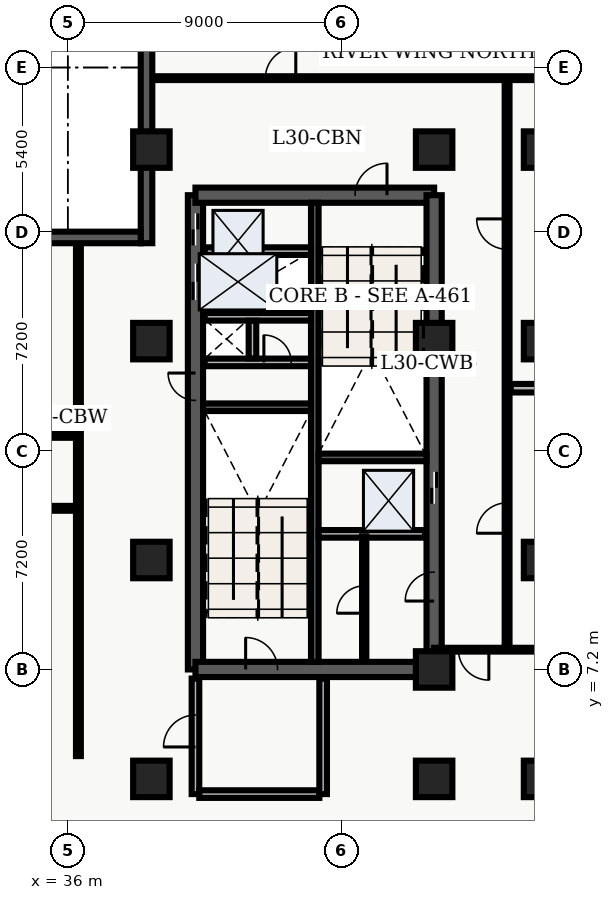
"""IFC4 building model, lengths in metres.
Left out: names, types, materials, properties, quantities, classifications, styles, units other than length and angle.
Written with IfcOpenShell. Run it as: python <this file> out.ifc"""

import sys

from ifc_helpers import new_model, entity, si_unit, converted_unit, direction, frame, origin_with_axes, origin_2d_with_axis, place, context, subcontext, project, spatial, polyline, rectangle, outline, extrude, element, fill, save


model = new_model("IFC4")
c1 = context("Model", 3, precision=1e-05, world=origin_with_axes(), true_north=direction((0.0, 1.0)))
c2 = subcontext(c1, "Body", "Model", "MODEL_VIEW")
j1 = project(units=[si_unit("LENGTHUNIT", "METRE"), converted_unit("PLANEANGLEUNIT", "DEGREE", entity("IfcPlaneAngleMeasure", 0.017), si_unit("PLANEANGLEUNIT", "RADIAN"), dimensions=[0, 0, 0, 0, 0, 0, 0])], contexts=[c1])
p1 = place(None, origin_with_axes())
s1 = spatial("IfcSite", under=j1, at=p1, CompositionType="ELEMENT")
p2 = place(p1, origin_with_axes())
s2 = spatial("IfcBuilding", under=s1, at=p2, CompositionType="ELEMENT")
p3 = place(p2, frame((0.0, 0.0, 124.2), z_axis=(0.0, 0.0, 1.0), x_axis=(1.0, 0.0, 0.0)))
s3 = spatial("IfcBuildingStorey", under=s2, at=p3, CompositionType="ELEMENT", Elevation=124.2)
p4 = place(p3, frame((40.2, 7.2, 0.0), z_axis=(0.0, 0.0, 1.0), x_axis=(0.0, 1.0, 0.0)))
e1 = element("IfcWall", 1, at=p4, inside=s3, PredefinedType="SHEAR", context=c2, shape_type="SweptSolid", body=[
    extrude(outline(polyline([(0.0, -0.25), (15.6, -0.25), (15.6, 0.25), (0.0, 0.25), (0.0, -0.25)])), origin_with_axes(), (0.0, 0.0, 1.0), 4.56),
])
p5 = place(p4, frame((14.475, 0.0, 0.0), z_axis=(0.0, 0.0, 1.0), x_axis=(1.0, 0.0, 0.0)))
e2 = element("IfcOpeningElement", 2, at=p5, cuts=e1, PredefinedType="OPENING", context=c2, shape_type="SweptSolid", body=[
    extrude(rectangle(XDim=1.05, YDim=0.52, at=origin_2d_with_axis()), origin_with_axes(), (0.0, 0.0, 1.0), 2.15),
])
p6 = place(p4, frame((12.75, 0.0, 0.0), z_axis=(0.0, 0.0, 1.0), x_axis=(1.0, 0.0, 0.0)))
e3 = element("IfcOpeningElement", 3, at=p6, cuts=e1, PredefinedType="OPENING", context=c2, shape_type="SweptSolid", body=[
    extrude(rectangle(XDim=1.2, YDim=0.52, at=origin_2d_with_axis()), origin_with_axes(), (0.0, 0.0, 1.0), 2.15),
])
p7 = place(p4, frame((9.3, 0.0, 0.0), z_axis=(0.0, 0.0, 1.0), x_axis=(1.0, 0.0, 0.0)))
e4 = element("IfcOpeningElement", 4, at=p7, cuts=e1, PredefinedType="OPENING", context=c2, shape_type="SweptSolid", body=[
    extrude(rectangle(XDim=0.9, YDim=0.52, at=origin_2d_with_axis()), origin_with_axes(), (0.0, 0.0, 1.0), 2.15),
])
p8 = place(p3, frame((40.2, 7.2, 0.0), z_axis=(0.0, 0.0, 1.0), x_axis=(1.0, 0.0, 0.0)))
e5 = element("IfcWall", 5, at=p8, inside=s3, PredefinedType="SHEAR", context=c2, shape_type="SweptSolid", body=[
    extrude(outline(polyline([(0.0, -0.25), (7.85, -0.25), (7.85, 0.25), (0.0, 0.25), (0.0, -0.25)])), origin_with_axes(), (0.0, 0.0, 1.0), 4.56),
])
p9 = place(p8, frame((2.175, 0.0, 0.0), z_axis=(0.0, 0.0, 1.0), x_axis=(1.0, 0.0, 0.0)))
e6 = element("IfcOpeningElement", 6, at=p9, cuts=e5, PredefinedType="OPENING", context=c2, shape_type="SweptSolid", body=[
    extrude(rectangle(XDim=1.05, YDim=0.52, at=origin_2d_with_axis()), origin_with_axes(), (0.0, 0.0, 1.0), 2.15),
])
p10 = place(p3, frame((40.2, 22.8, 0.0), z_axis=(0.0, 0.0, 1.0), x_axis=(1.0, 0.0, 0.0)))
e7 = element("IfcWall", 7, at=p10, inside=s3, PredefinedType="SHEAR", context=c2, shape_type="SweptSolid", body=[
    extrude(outline(polyline([(0.0, -0.25), (7.85, -0.25), (7.85, 0.25), (0.0, 0.25), (0.0, -0.25)])), origin_with_axes(), (0.0, 0.0, 1.0), 4.56),
])
p11 = place(p10, frame((5.775, 0.0, 0.0), z_axis=(0.0, 0.0, 1.0), x_axis=(1.0, 0.0, 0.0)))
e8 = element("IfcOpeningElement", 8, at=p11, cuts=e7, PredefinedType="OPENING", context=c2, shape_type="SweptSolid", body=[
    extrude(rectangle(XDim=1.05, YDim=0.52, at=origin_2d_with_axis()), origin_with_axes(), (0.0, 0.0, 1.0), 2.15),
])
p12 = place(p3, frame((48.05, 7.2, 0.0), z_axis=(0.0, 0.0, 1.0), x_axis=(0.0, 1.0, 0.0)))
e9 = element("IfcWall", 9, at=p12, inside=s3, PredefinedType="SHEAR", context=c2, shape_type="SweptSolid", body=[
    extrude(outline(polyline([(0.0, -0.25), (15.6, -0.25), (15.6, 0.25), (0.0, 0.25), (0.0, -0.25)])), origin_with_axes(), (0.0, 0.0, 1.0), 4.56),
])
p13 = place(p12, frame((5.975, 0.0, 0.0), z_axis=(0.0, 0.0, 1.0), x_axis=(1.0, 0.0, 0.0)))
e10 = element("IfcOpeningElement", 10, at=p13, cuts=e9, PredefinedType="OPENING", context=c2, shape_type="SweptSolid", body=[
    extrude(rectangle(XDim=1.05, YDim=0.52, at=origin_2d_with_axis()), origin_with_axes(), (0.0, 0.0, 1.0), 2.15),
])
p14 = place(p12, frame((2.725, 0.0, 0.0), z_axis=(0.0, 0.0, 1.0), x_axis=(1.0, 0.0, 0.0)))
e11 = element("IfcOpeningElement", 11, at=p14, cuts=e9, PredefinedType="OPENING", context=c2, shape_type="SweptSolid", body=[
    extrude(rectangle(XDim=0.95, YDim=0.52, at=origin_2d_with_axis()), origin_with_axes(), (0.0, 0.0, 1.0), 2.15),
])
p15 = place(p3, frame((44.125, 7.45, 0.0), z_axis=(0.0, 0.0, 1.0), x_axis=(0.0, 1.0, 0.0)))
e12 = element("IfcWall", 12, at=p15, inside=s3, PredefinedType="SHEAR", context=c2, shape_type="SweptSolid", body=[
    extrude(outline(polyline([(0.0, -0.125), (15.1, -0.125), (15.1, 0.125), (0.0, 0.125), (0.0, -0.125)])), origin_with_axes(), (0.0, 0.0, 1.0), 4.56),
])
for number, where, z_axis, x_axis in (
    (13, (40.45, 15.825, 0.0), (0.0, 0.0, 1.0), (1.0, 0.0, 0.0)),
    (14, (44.25, 14.175, 0.0), (0.0, 0.0, 1.0), (1.0, 0.0, 0.0)),
):
    element("IfcWall", number, at=place(p3, frame(where, z_axis=z_axis, x_axis=x_axis)), inside=s3, PredefinedType="SHEAR", context=c2, shape_type="SweptSolid", body=[
        extrude(outline(polyline([(0.0, -0.125), (3.55, -0.125), (3.55, 0.125), (0.0, 0.125), (0.0, -0.125)])), origin_with_axes(), (0.0, 0.0, 1.0), 4.56),
    ])
p16 = place(p3, frame((40.5, 17.3, 0.0), z_axis=(0.0, 0.0, 1.0), x_axis=(1.0, 0.0, 0.0)))
e15 = element("IfcWall", 15, at=p16, inside=s3, PredefinedType="SOLIDWALL", context=c2, shape_type="SweptSolid", body=[
    extrude(outline(polyline([(0.0, -0.125), (3.5, -0.125), (3.5, 0.125), (0.0, 0.125), (0.0, -0.125)])), origin_with_axes(), (0.0, 0.0, 1.0), 3.6),
])
p17 = place(p16, frame((2.4, 0.0, 0.0), z_axis=(0.0, 0.0, 1.0), x_axis=(1.0, 0.0, 0.0)))
e16 = element("IfcOpeningElement", 16, at=p17, cuts=e15, PredefinedType="OPENING", context=c2, shape_type="SweptSolid", body=[
    extrude(rectangle(XDim=0.9, YDim=0.27, at=origin_2d_with_axis()), origin_with_axes(), (0.0, 0.0, 1.0), 2.15),
])
p18 = place(p3, frame((40.5, 18.8, 0.0), z_axis=(0.0, 0.0, 1.0), x_axis=(1.0, 0.0, 0.0)))
e17 = element("IfcWall", 17, at=p18, inside=s3, PredefinedType="SOLIDWALL", context=c2, shape_type="SweptSolid", body=[
    extrude(outline(polyline([(0.0, -0.125), (3.5, -0.125), (3.5, 0.125), (0.0, 0.125), (0.0, -0.125)])), origin_with_axes(), (0.0, 0.0, 1.0), 3.6),
])
p19 = place(p3, frame((42.075, 17.43, 0.0), z_axis=(0.0, 0.0, 1.0), x_axis=(0.0, 1.0, 0.0)))
e18 = element("IfcWall", 18, at=p19, inside=s3, PredefinedType="SOLIDWALL", context=c2, shape_type="SweptSolid", body=[
    extrude(outline(polyline([(0.0, -0.125), (1.24, -0.125), (1.24, 0.125), (0.0, 0.125), (0.0, -0.125)])), origin_with_axes(), (0.0, 0.0, 1.0), 3.6),
])
p20 = place(p3, frame((40.2, 3.1, 0.0), z_axis=(0.0, 0.0, 1.0), x_axis=(0.0, 1.0, 0.0)))
e19 = element("IfcWall", 19, at=p20, inside=s3, PredefinedType="SOLIDWALL", context=c2, shape_type="SweptSolid", body=[
    extrude(outline(polyline([(0.0, -0.125), (3.8, -0.125), (3.8, 0.125), (0.0, 0.125), (0.0, -0.125)])), origin_with_axes(), (0.0, 0.0, 1.0), 3.6),
])
p21 = place(p20, frame((2.075, 0.0, 0.0), z_axis=(0.0, 0.0, 1.0), x_axis=(1.0, 0.0, 0.0)))
e20 = element("IfcOpeningElement", 20, at=p21, cuts=e19, PredefinedType="OPENING", context=c2, shape_type="SweptSolid", body=[
    extrude(rectangle(XDim=1.05, YDim=0.27, at=origin_2d_with_axis()), origin_with_axes(), (0.0, 0.0, 1.0), 2.15),
])
p22 = place(p3, frame((40.325, 3.1, 0.0), z_axis=(0.0, 0.0, 1.0), x_axis=(1.0, 0.0, 0.0)))
e21 = element("IfcWall", 21, at=p22, inside=s3, PredefinedType="SOLIDWALL", context=c2, shape_type="SweptSolid", body=[
    extrude(outline(polyline([(0.0, -0.125), (3.95, -0.125), (3.95, 0.125), (0.0, 0.125), (0.0, -0.125)])), origin_with_axes(), (0.0, 0.0, 1.0), 3.6),
])
p23 = place(p3, frame((44.4, 3.1, 0.0), z_axis=(0.0, 0.0, 1.0), x_axis=(0.0, 1.0, 0.0)))
e22 = element("IfcWall", 22, at=p23, inside=s3, PredefinedType="SOLIDWALL", context=c2, shape_type="SweptSolid", body=[
    extrude(outline(polyline([(0.0, -0.125), (3.8, -0.125), (3.8, 0.125), (0.0, 0.125), (0.0, -0.125)])), origin_with_axes(), (0.0, 0.0, 1.0), 3.6),
])
for number, where, z_axis, x_axis in (
    (23, (38.75, 3.6, 0.0), (0.0, 0.0, 1.0), (1.0, 0.0, 0.0)),
    (24, (38.75, 10.8, 0.0), (0.0, 0.0, 1.0), (1.0, 0.0, 0.0)),
    (25, (38.75, 18.0, 0.0), (0.0, 0.0, 1.0), (1.0, 0.0, 0.0)),
    (26, (38.75, 24.3, 0.0), (0.0, 0.0, 1.0), (1.0, 0.0, 0.0)),
    (27, (48.05, 3.6, 0.0), (0.0, 0.0, 1.0), (1.0, 0.0, 0.0)),
    (28, (48.05, 7.2, 0.0), (0.0, 0.0, 1.0), (1.0, 0.0, 0.0)),
    (29, (48.05, 18.0, 0.0), (0.0, 0.0, 1.0), (1.0, 0.0, 0.0)),
    (30, (48.05, 24.3, 0.0), (0.0, 0.0, 1.0), (1.0, 0.0, 0.0)),
    (31, (51.6, 3.6, 0.0), (0.0, 0.0, 1.0), (1.0, 0.0, 0.0)),
    (32, (51.6, 10.8, 0.0), (0.0, 0.0, 1.0), (1.0, 0.0, 0.0)),
    (33, (51.6, 18.0, 0.0), (0.0, 0.0, 1.0), (1.0, 0.0, 0.0)),
    (34, (51.6, 24.3, 0.0), (0.0, 0.0, 1.0), (1.0, 0.0, 0.0)),
):
    element("IfcColumn", number, at=place(p3, frame(where, z_axis=z_axis, x_axis=x_axis)), inside=s3, PredefinedType="COLUMN", context=c2, shape_type="SweptSolid", body=[
        extrude(rectangle(XDim=1.2, YDim=1.2, at=origin_2d_with_axis()), origin_with_axes(), (0.0, 0.0, 1.0), 4.8),
    ])
for number, where, z_axis, x_axis in (
    (35, (40.5, 20.96, 0.0), (0.0, 0.0, 1.0), (1.0, 0.0, 0.0)),
    (36, (44.25, 11.66, 0.0), (0.0, 0.0, 1.0), (1.0, 0.0, 0.0)),
):
    element("IfcWall", number, at=place(p3, frame(where, z_axis=z_axis, x_axis=x_axis)), inside=s3, PredefinedType="SOLIDWALL", context=c2, shape_type="SweptSolid", body=[
        extrude(outline(polyline([(0.0, -0.125), (3.5, -0.125), (3.5, 0.125), (0.0, 0.125), (0.0, -0.125)])), origin_with_axes(), (0.0, 0.0, 1.0), 3.2),
    ])
p24 = place(p3, frame((45.75, 7.5, 0.0), z_axis=(0.0, 0.0, 1.0), x_axis=(0.0, 1.0, 0.0)))
e37 = element("IfcWall", 37, at=p24, inside=s3, PredefinedType="PARTITIONING", context=c2, shape_type="SweptSolid", body=[
    extrude(outline(polyline([(0.0, -0.07), (4.08, -0.07), (4.08, 0.07), (0.0, 0.07), (0.0, -0.07)])), origin_with_axes(), (0.0, 0.0, 1.0), 3.2),
])
p25 = place(p24, frame((2.0, 0.0, 0.0), z_axis=(0.0, 0.0, 1.0), x_axis=(1.0, 0.0, 0.0)))
e38 = element("IfcOpeningElement", 38, at=p25, cuts=e37, PredefinedType="OPENING", context=c2, shape_type="SweptSolid", body=[
    extrude(rectangle(XDim=0.9, YDim=0.16, at=origin_2d_with_axis()), origin_with_axes(), (0.0, 0.0, 1.0), 2.15),
])
p26 = place(p3, frame((21.15, 12.5, 0.0), z_axis=(0.0, 0.0, 1.0), x_axis=(1.0, 0.0, 0.0)))
e39 = element("IfcWall", 39, at=p26, inside=s3, PredefinedType="PARTITIONING", context=c2, shape_type="SweptSolid", body=[
    extrude(outline(polyline([(0.0, -0.08), (15.2, -0.08), (15.2, 0.08), (0.0, 0.08), (0.0, -0.08)])), origin_with_axes(), (0.0, 0.0, 1.0), 3.2),
])
p27 = place(p26, frame((3.505, 0.0, 0.0), z_axis=(0.0, 0.0, 1.0), x_axis=(1.0, 0.0, 0.0)))
e40 = element("IfcOpeningElement", 40, at=p27, cuts=e39, PredefinedType="OPENING", context=c2, shape_type="SweptSolid", body=[
    extrude(rectangle(XDim=1.0, YDim=0.18, at=origin_2d_with_axis()), origin_with_axes(), (0.0, 0.0, 1.0), 2.15),
])
p28 = place(p26, frame((10.975, 0.0, 0.0), z_axis=(0.0, 0.0, 1.0), x_axis=(1.0, 0.0, 0.0)))
e41 = element("IfcOpeningElement", 41, at=p28, cuts=e39, PredefinedType="OPENING", context=c2, shape_type="SweptSolid", body=[
    extrude(rectangle(XDim=1.0, YDim=0.18, at=origin_2d_with_axis()), origin_with_axes(), (0.0, 0.0, 1.0), 2.15),
])
p29 = place(p3, frame((21.15, 14.9, 0.0), z_axis=(0.0, 0.0, 1.0), x_axis=(1.0, 0.0, 0.0)))
e42 = element("IfcWall", 42, at=p29, inside=s3, PredefinedType="PARTITIONING", context=c2, shape_type="SweptSolid", body=[
    extrude(outline(polyline([(0.0, -0.08), (15.2, -0.08), (15.2, 0.08), (0.0, 0.08), (0.0, -0.08)])), origin_with_axes(), (0.0, 0.0, 1.0), 3.2),
])
p30 = place(p29, frame((3.43, 0.0, 0.0), z_axis=(0.0, 0.0, 1.0), x_axis=(1.0, 0.0, 0.0)))
e43 = element("IfcOpeningElement", 43, at=p30, cuts=e42, PredefinedType="OPENING", context=c2, shape_type="SweptSolid", body=[
    extrude(rectangle(XDim=1.0, YDim=0.18, at=origin_2d_with_axis()), origin_with_axes(), (0.0, 0.0, 1.0), 2.15),
])
p31 = place(p29, frame((10.9, 0.0, 0.0), z_axis=(0.0, 0.0, 1.0), x_axis=(1.0, 0.0, 0.0)))
e44 = element("IfcOpeningElement", 44, at=p31, cuts=e42, PredefinedType="OPENING", context=c2, shape_type="SweptSolid", body=[
    extrude(rectangle(XDim=1.0, YDim=0.18, at=origin_2d_with_axis()), origin_with_axes(), (0.0, 0.0, 1.0), 2.15),
])
p32 = place(p3, frame((36.35, 4.35, 0.0), z_axis=(0.0, 0.0, 1.0), x_axis=(0.0, 1.0, 0.0)))
e45 = element("IfcWall", 45, at=p32, inside=s3, PredefinedType="PARTITIONING", context=c2, shape_type="SweptSolid", body=[
    extrude(outline(polyline([(0.0, -0.08), (16.95, -0.08), (16.95, 0.08), (0.0, 0.08), (0.0, -0.08)])), origin_with_axes(), (0.0, 0.0, 1.0), 3.2),
])
p33 = place(p3, frame((50.45, 7.85, 0.0), z_axis=(0.0, 0.0, 1.0), x_axis=(0.0, 1.0, 0.0)))
e46 = element("IfcWall", 46, at=p33, inside=s3, PredefinedType="PARTITIONING", context=c2, shape_type="SweptSolid", body=[
    extrude(outline(polyline([(0.0, -0.08), (18.8, -0.08), (18.8, 0.08), (0.0, 0.08), (0.0, -0.08)])), origin_with_axes(), (0.0, 0.0, 1.0), 3.2),
])
p34 = place(p33, frame((4.33, 0.0, 0.0), z_axis=(0.0, 0.0, 1.0), x_axis=(1.0, 0.0, 0.0)))
e47 = element("IfcOpeningElement", 47, at=p34, cuts=e46, PredefinedType="OPENING", context=c2, shape_type="SweptSolid", body=[
    extrude(rectangle(XDim=1.0, YDim=0.18, at=origin_2d_with_axis()), origin_with_axes(), (0.0, 0.0, 1.0), 2.15),
])
p35 = place(p33, frame((13.671, 0.0, 0.0), z_axis=(0.0, 0.0, 1.0), x_axis=(1.0, 0.0, 0.0)))
e48 = element("IfcOpeningElement", 48, at=p35, cuts=e46, PredefinedType="OPENING", context=c2, shape_type="SweptSolid", body=[
    extrude(rectangle(XDim=1.0, YDim=0.18, at=origin_2d_with_axis()), origin_with_axes(), (0.0, 0.0, 1.0), 2.15),
])
p36 = place(p3, frame((59.64, 7.85, 0.0), z_axis=(0.0, 0.0, 1.0), x_axis=(-1.0, 0.0, 0.0)))
e49 = element("IfcWall", 49, at=p36, inside=s3, PredefinedType="PARTITIONING", context=c2, shape_type="SweptSolid", body=[
    extrude(outline(polyline([(0.0, -0.062), (11.59, -0.062), (11.59, 0.062), (0.0, 0.062), (0.0, -0.062)])), origin_with_axes(), (0.0, 0.0, 1.0), 3.2),
])
p37 = place(p36, frame((10.29, 0.0, 0.0), z_axis=(0.0, 0.0, 1.0), x_axis=(1.0, 0.0, 0.0)))
e50 = element("IfcOpeningElement", 50, at=p37, cuts=e49, PredefinedType="OPENING", context=c2, shape_type="SweptSolid", body=[
    extrude(rectangle(XDim=1.0, YDim=0.145, at=origin_2d_with_axis()), origin_with_axes(), (0.0, 0.0, 1.0), 2.15),
])
p38 = place(p3, frame((38.76, 26.65, 0.0), z_axis=(0.0, 0.0, 1.0), x_axis=(1.0, 0.0, 0.0)))
e51 = element("IfcWall", 51, at=p38, inside=s3, PredefinedType="PARTITIONING", context=c2, shape_type="SweptSolid", body=[
    extrude(outline(polyline([(0.0, -0.062), (20.88, -0.062), (20.88, 0.062), (0.0, 0.062), (0.0, -0.062)])), origin_with_axes(), (0.0, 0.0, 1.0), 3.2),
])
p39 = place(p38, frame((4.24, 0.0, 0.0), z_axis=(0.0, 0.0, 1.0), x_axis=(1.0, 0.0, 0.0)))
e52 = element("IfcOpeningElement", 52, at=p39, cuts=e51, PredefinedType="OPENING", context=c2, shape_type="SweptSolid", body=[
    extrude(rectangle(XDim=1.0, YDim=0.145, at=origin_2d_with_axis()), origin_with_axes(), (0.0, 0.0, 1.0), 2.15),
])
p40 = place(p3, frame((50.57, 16.451, 0.0), z_axis=(0.0, 0.0, 1.0), x_axis=(1.0, 0.0, 0.0)))
e53 = element("IfcWall", 53, at=p40, inside=s3, PredefinedType="PARTITIONING", context=c2, shape_type="SweptSolid", body=[
    extrude(outline(polyline([(0.0, -0.14), (9.055, -0.14), (9.055, 0.14), (0.0, 0.14), (0.0, -0.14)])), origin_with_axes(), (0.0, 0.0, 1.0), 3.2),
])
p41 = place(p3, frame((38.59, 21.22, 0.0), z_axis=(0.0, 0.0, 1.0), x_axis=(0.0, 1.0, 0.0)))
e54 = element("IfcWall", 54, at=p41, inside=s3, PredefinedType="SOLIDWALL", context=c2, shape_type="SweptSolid", body=[
    extrude(outline(polyline([(0.0, -0.19), (7.58, -0.19), (7.58, 0.19), (0.0, 0.19), (0.0, -0.19)])), origin_with_axes(), (0.0, 0.0, 1.0), 4.56),
])
p42 = place(p3, frame((21.22, 21.41, 0.0), z_axis=(0.0, 0.0, 1.0), x_axis=(1.0, 0.0, 0.0)))
e55 = element("IfcWall", 55, at=p42, inside=s3, PredefinedType="SOLIDWALL", context=c2, shape_type="SweptSolid", body=[
    extrude(outline(polyline([(0.0, -0.19), (17.18, -0.19), (17.18, 0.19), (0.0, 0.19), (0.0, -0.19)])), origin_with_axes(), (0.0, 0.0, 1.0), 4.56),
])
p43 = place(p12, frame((5.975, 0.0, 0.0), z_axis=(0.0, 0.0, 1.0), x_axis=(1.0, 0.0, 0.0)))
e56 = element("IfcDoor", 56, at=p43, inside=s3, OperationType="SLIDING_TO_LEFT", PredefinedType="DOOR", context=c2, shape_type="SweptSolid", body=[
    extrude(rectangle(XDim=1.05, YDim=0.09, at=origin_2d_with_axis()), origin_with_axes(), (0.0, 0.0, 1.0), 2.15),
])
fill(e10, e56)
p44 = place(p4, frame((14.475, 0.0, 0.0), z_axis=(0.0, 0.0, 1.0), x_axis=(1.0, 0.0, 0.0)))
e57 = element("IfcDoor", 57, at=p44, inside=s3, OperationType="SLIDING_TO_RIGHT", PredefinedType="DOOR", context=c2, shape_type="SweptSolid", body=[
    extrude(rectangle(XDim=1.05, YDim=0.09, at=origin_2d_with_axis()), origin_with_axes(), (0.0, 0.0, 1.0), 2.15),
])
fill(e2, e57)
p45 = place(p4, frame((12.75, 0.0, 0.0), z_axis=(0.0, 0.0, 1.0), x_axis=(1.0, 0.0, 0.0)))
e58 = element("IfcDoor", 58, at=p45, inside=s3, OperationType="DOUBLE_DOOR_SLIDING", PredefinedType="DOOR", context=c2, shape_type="SweptSolid", body=[
    extrude(rectangle(XDim=1.2, YDim=0.09, at=origin_2d_with_axis()), origin_with_axes(), (0.0, 0.0, 1.0), 2.15),
])
fill(e3, e58)
p46 = place(p4, frame((9.3, 0.0, 0.0), z_axis=(0.0, 0.0, 1.0), x_axis=(1.0, 0.0, 0.0)))
e59 = element("IfcDoor", 59, at=p46, inside=s3, OperationType="SINGLE_SWING_RIGHT", PredefinedType="DOOR", context=c2, shape_type="SweptSolid", body=[
    extrude(rectangle(XDim=0.9, YDim=0.09, at=origin_2d_with_axis()), origin_with_axes(), (0.0, 0.0, 1.0), 2.15),
])
fill(e4, e59)
p47 = place(p16, frame((2.4, 0.0, 0.0), z_axis=(0.0, 0.0, 1.0), x_axis=(1.0, 0.0, 0.0)))
e60 = element("IfcDoor", 60, at=p47, inside=s3, OperationType="SINGLE_SWING_LEFT", PredefinedType="DOOR", context=c2, shape_type="SweptSolid", body=[
    extrude(rectangle(XDim=0.9, YDim=0.09, at=origin_2d_with_axis()), origin_with_axes(), (0.0, 0.0, 1.0), 2.15),
])
fill(e16, e60)
p48 = place(p8, frame((2.175, 0.0, 0.0), z_axis=(0.0, 0.0, 1.0), x_axis=(1.0, 0.0, 0.0)))
e61 = element("IfcDoor", 61, at=p48, inside=s3, OperationType="SINGLE_SWING_LEFT", PredefinedType="DOOR", context=c2, shape_type="SweptSolid", body=[
    extrude(rectangle(XDim=1.05, YDim=0.09, at=origin_2d_with_axis()), origin_with_axes(), (0.0, 0.0, 1.0), 2.15),
])
fill(e6, e61)
p49 = place(p10, frame((5.775, 0.0, 0.0), z_axis=(0.0, 0.0, 1.0), x_axis=(1.0, 0.0, 0.0)))
e62 = element("IfcDoor", 62, at=p49, inside=s3, OperationType="SINGLE_SWING_RIGHT", PredefinedType="DOOR", context=c2, shape_type="SweptSolid", body=[
    extrude(rectangle(XDim=1.05, YDim=0.09, at=origin_2d_with_axis()), origin_with_axes(), (0.0, 0.0, 1.0), 2.15),
])
fill(e8, e62)
p50 = place(p20, frame((2.075, 0.0, 0.0), z_axis=(0.0, 0.0, 1.0), x_axis=(1.0, 0.0, 0.0)))
e63 = element("IfcDoor", 63, at=p50, inside=s3, OperationType="SINGLE_SWING_LEFT", PredefinedType="DOOR", context=c2, shape_type="SweptSolid", body=[
    extrude(rectangle(XDim=1.05, YDim=0.09, at=origin_2d_with_axis()), origin_with_axes(), (0.0, 0.0, 1.0), 2.15),
])
fill(e20, e63)
p51 = place(p24, frame((2.0, 0.0, 0.0), z_axis=(0.0, 0.0, 1.0), x_axis=(1.0, 0.0, 0.0)))
e64 = element("IfcDoor", 64, at=p51, inside=s3, OperationType="SINGLE_SWING_LEFT", PredefinedType="DOOR", context=c2, shape_type="SweptSolid", body=[
    extrude(rectangle(XDim=0.9, YDim=0.084, at=origin_2d_with_axis()), origin_with_axes(), (0.0, 0.0, 1.0), 2.15),
])
fill(e38, e64)
p52 = place(p12, frame((2.725, 0.0, 0.0), z_axis=(0.0, 0.0, 1.0), x_axis=(1.0, 0.0, 0.0)))
e65 = element("IfcDoor", 65, at=p52, inside=s3, OperationType="SINGLE_SWING_LEFT", PredefinedType="DOOR", context=c2, shape_type="SweptSolid", body=[
    extrude(rectangle(XDim=0.95, YDim=0.09, at=origin_2d_with_axis()), origin_with_axes(), (0.0, 0.0, 1.0), 2.15),
])
fill(e11, e65)
p53 = place(p36, frame((10.29, 0.0, 0.0), z_axis=(0.0, 0.0, 1.0), x_axis=(1.0, 0.0, 0.0)))
e66 = element("IfcDoor", 66, at=p53, inside=s3, OperationType="SINGLE_SWING_LEFT", PredefinedType="DOOR", context=c2, shape_type="SweptSolid", body=[
    extrude(rectangle(XDim=1.0, YDim=0.075, at=origin_2d_with_axis()), origin_with_axes(), (0.0, 0.0, 1.0), 2.15),
])
fill(e50, e66)
p54 = place(p38, frame((4.24, 0.0, 0.0), z_axis=(0.0, 0.0, 1.0), x_axis=(1.0, 0.0, 0.0)))
e67 = element("IfcDoor", 67, at=p54, inside=s3, OperationType="SINGLE_SWING_RIGHT", PredefinedType="DOOR", context=c2, shape_type="SweptSolid", body=[
    extrude(rectangle(XDim=1.0, YDim=0.075, at=origin_2d_with_axis()), origin_with_axes(), (0.0, 0.0, 1.0), 2.15),
])
fill(e52, e67)
p55 = place(p33, frame((4.33, 0.0, 0.0), z_axis=(0.0, 0.0, 1.0), x_axis=(1.0, 0.0, 0.0)))
e68 = element("IfcDoor", 68, at=p55, inside=s3, OperationType="SINGLE_SWING_LEFT", PredefinedType="DOOR", context=c2, shape_type="SweptSolid", body=[
    extrude(rectangle(XDim=1.0, YDim=0.09, at=origin_2d_with_axis()), origin_with_axes(), (0.0, 0.0, 1.0), 2.15),
])
fill(e47, e68)
p56 = place(p33, frame((13.671, 0.0, 0.0), z_axis=(0.0, 0.0, 1.0), x_axis=(1.0, 0.0, 0.0)))
e69 = element("IfcDoor", 69, at=p56, inside=s3, OperationType="SINGLE_SWING_RIGHT", PredefinedType="DOOR", context=c2, shape_type="SweptSolid", body=[
    extrude(rectangle(XDim=1.0, YDim=0.09, at=origin_2d_with_axis()), origin_with_axes(), (0.0, 0.0, 1.0), 2.15),
])
fill(e48, e69)
save(model, sys.argv[1])
